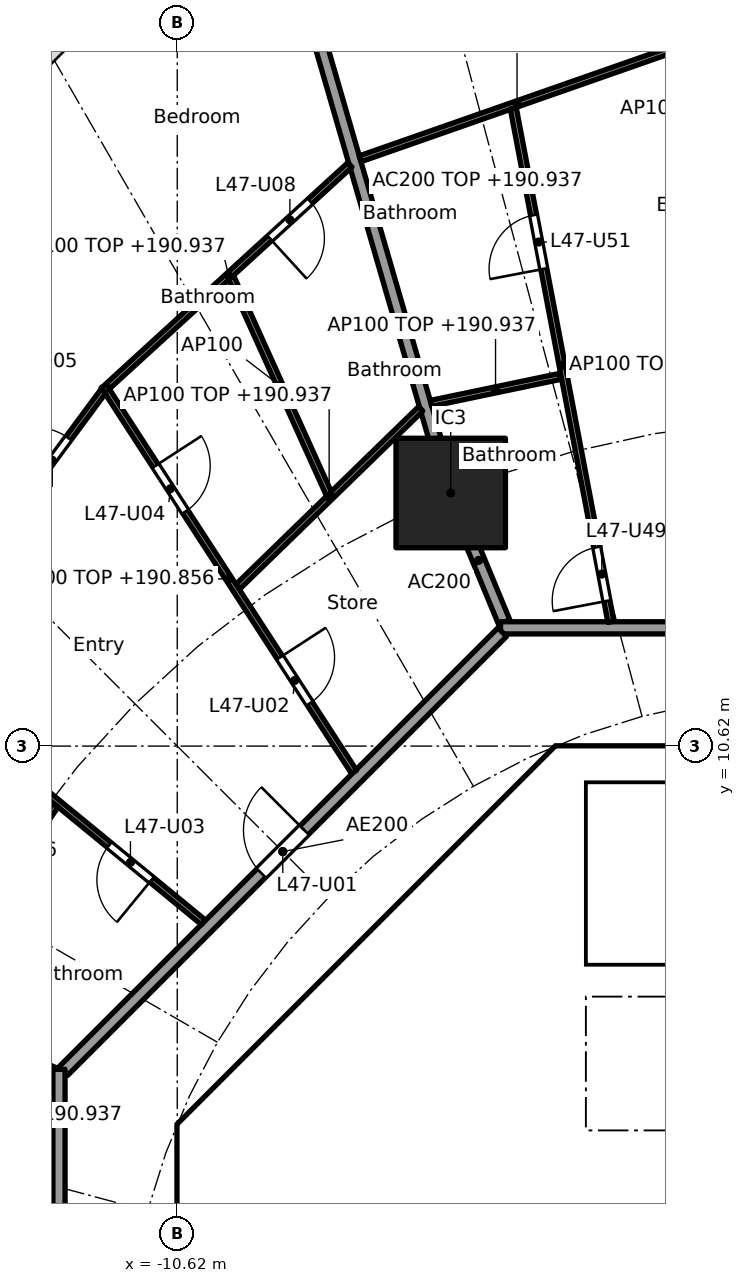
"""IFC4 building model, lengths in metres.
Left out: names, types, materials, properties, quantities, classifications, styles, units other than length and angle.
Written with IfcOpenShell. Run it as: python <this file> out.ifc"""

import sys

from ifc_helpers import new_model, si_unit, direction, frame, frame_2d, origin, origin_2d, place, context, subcontext, project, spatial, polyline, rectangle, outline, extrude, element, fill, save


model = new_model("IFC4")
c1 = context("Model", 3, precision=1e-05, world=origin(), true_north=direction((0.0, 1.0)))
c2 = subcontext(c1, "Body", "Model", "MODEL_VIEW")
j1 = project(units=[si_unit("LENGTHUNIT", "METRE"), si_unit("PLANEANGLEUNIT", "RADIAN")], contexts=[c1])
p1 = place(None, origin())
s1 = spatial("IfcSite", under=j1, at=p1, CompositionType="ELEMENT")
p2 = place(p1, origin())
s2 = spatial("IfcBuilding", under=s1, at=p2, CompositionType="ELEMENT")
p3 = place(p2, frame((0.0, 0.0, 188.1)))
s3 = spatial("IfcBuildingStorey", under=s2, at=p3, CompositionType="ELEMENT", Elevation=188.1)
p4 = place(p3, frame((-6.123, 14.782, 0.0), z_axis=(0.0, 0.0, 1.0), x_axis=(1.0, 0.0, 0.0)))
e1 = element("IfcColumn", 1, at=p4, inside=s3, PredefinedType="COLUMN", context=c2, shape_type="SweptSolid", body=[
    extrude(rectangle(XDim=1.8, YDim=1.8, at=origin_2d()), origin(), (0.0, 0.0, 1.0), 3.7),
])
p5 = place(p3, frame((-4.613, 9.988, 0.0), z_axis=(0.0, 0.0, 1.0), x_axis=(-0.707106781187, -0.707106781187, 0.0)))
e2 = element("IfcWall", 2, at=p5, inside=s3, PredefinedType="SHEAR", context=c2, shape_type="SweptSolid", body=[
    extrude(rectangle(XDim=7.602, YDim=0.6, at=frame_2d((3.801, 0.0))), origin(), (0.0, 0.0, 1.0), 3.44),
])
p6 = place(p5, frame((0.351, 0.0, 0.0)))
e3 = element("IfcOpeningElement", 3, at=p6, cuts=e2, PredefinedType="OPENING", context=c2, shape_type="SweptSolid", body=[
    extrude(rectangle(XDim=1.1, YDim=2.1, at=frame_2d((0.55, 1.05))), frame((0.0, 0.31, 0.0), z_axis=(0.0, -1.0, 0.0), x_axis=(1.0, 0.0, 0.0)), (0.0, 0.0, 1.0), 0.62),
])
p7 = place(p3, frame((-10.325, 3.801, 0.0), z_axis=(0.0, 0.0, 1.0), x_axis=(0.0, -1.0, 0.0)))
e4 = element("IfcWall", 4, at=p7, inside=s3, PredefinedType="SHEAR", context=c2, shape_type="SweptSolid", body=[
    extrude(rectangle(XDim=7.602, YDim=0.6, at=frame_2d((3.801, 0.0))), origin(), (0.0, 0.0, 1.0), 3.44),
])
p8 = place(p7, frame((0.651, 0.0, 0.0)))
e5 = element("IfcOpeningElement", 5, at=p8, cuts=e4, PredefinedType="OPENING", context=c2, shape_type="SweptSolid", body=[
    extrude(rectangle(XDim=1.5, YDim=2.1, at=frame_2d((0.75, 1.05))), frame((0.0, 0.31, 0.0), z_axis=(0.0, -1.0, 0.0), x_axis=(1.0, 0.0, 0.0)), (0.0, 0.0, 1.0), 0.62),
])
p9 = place(p7, frame((5.451, 0.0, 0.0)))
e6 = element("IfcOpeningElement", 6, at=p9, cuts=e4, PredefinedType="OPENING", context=c2, shape_type="SweptSolid", body=[
    extrude(rectangle(XDim=1.5, YDim=2.1, at=frame_2d((0.75, 1.05))), frame((0.0, 0.31, 0.0), z_axis=(0.0, -1.0, 0.0), x_axis=(1.0, 0.0, 0.0)), (0.0, 0.0, 1.0), 0.62),
])
p10 = place(p3, frame((-6.2, 4.3, 0.0), z_axis=(0.0, 0.0, 1.0), x_axis=(0.0, 1.0, 0.0)))
e7 = element("IfcWall", 7, at=p10, inside=s3, PredefinedType="PARTITIONING", context=c2, shape_type="SweptSolid", body=[
    extrude(rectangle(XDim=3.527, YDim=0.15, at=frame_2d((1.763, 0.0))), origin(), (0.0, 0.0, 1.0), 3.44),
])
p11 = place(p10, frame((0.262, 0.0, 0.0)))
e8 = element("IfcOpeningElement", 8, at=p11, cuts=e7, PredefinedType="OPENING", context=c2, shape_type="SweptSolid", body=[
    extrude(rectangle(XDim=0.9, YDim=2.1, at=frame_2d((0.45, 1.05))), frame((0.0, 0.085, 0.0), z_axis=(0.0, -1.0, 0.0), x_axis=(1.0, 0.0, 0.0)), (0.0, 0.0, 1.0), 0.17),
])
p12 = place(p10, frame((2.138, 0.0, 0.0)))
e9 = element("IfcOpeningElement", 9, at=p12, cuts=e7, PredefinedType="OPENING", context=c2, shape_type="SweptSolid", body=[
    extrude(rectangle(XDim=0.9, YDim=2.1, at=frame_2d((0.45, 1.05))), frame((0.0, 0.085, 0.0), z_axis=(0.0, -1.0, 0.0), x_axis=(1.0, 0.0, 0.0)), (0.0, 0.0, 1.0), 0.17),
])
p13 = place(p3, frame((-4.0, 4.3, 0.0), z_axis=(0.0, 0.0, 1.0), x_axis=(0.0, 1.0, 0.0)))
e10 = element("IfcWall", 10, at=p13, inside=s3, PredefinedType="SOLIDWALL", context=c2, shape_type="SweptSolid", body=[
    extrude(rectangle(XDim=2.2, YDim=0.2, at=frame_2d((1.1, 0.0))), origin(), (0.0, 0.0, 1.0), 3.44),
])
p14 = place(p13, frame((0.55, 0.0, 0.0)))
e11 = element("IfcOpeningElement", 11, at=p14, cuts=e10, PredefinedType="OPENING", context=c2, shape_type="SweptSolid", body=[
    extrude(rectangle(XDim=1.1, YDim=2.1, at=frame_2d((0.55, 1.05))), frame((0.0, 0.11, 0.0), z_axis=(0.0, -1.0, 0.0), x_axis=(1.0, 0.0, 0.0)), (0.0, 0.0, 1.0), 0.22),
])
p15 = place(p3, origin())
e12 = element("IfcWall", 12, at=p15, inside=s3, PredefinedType="SHEAR", context=c2, shape_type="SweptSolid", body=[
    extrude(outline(polyline([(-10.2, 4.825), (-9.776, 4.401), (-10.025, 4.152), (-10.025, 3.801), (-10.625, 3.801), (-10.625, 4.401), (-10.2, 4.825)])), origin(), (0.0, 0.0, 1.0), 3.44),
])
p16 = place(p3, origin())
e13 = element("IfcWall", 13, at=p16, inside=s3, PredefinedType="SHEAR", context=c2, shape_type="SweptSolid", body=[
    extrude(outline(polyline([(-4.152, 10.025), (-4.401, 9.776), (-4.825, 10.2), (-4.401, 10.625), (4.401, 10.625), (4.825, 10.2), (4.401, 9.776), (4.152, 10.025), (-4.152, 10.025)])), origin(), (0.0, 0.0, 1.0), 3.44),
])
p17 = place(p3, frame((-10.025, 4.0, 0.0), z_axis=(0.0, 0.0, 1.0), x_axis=(1.0, 0.0, 0.0)))
e14 = element("IfcWall", 14, at=p17, inside=s3, PredefinedType="PARTITIONING", context=c2, shape_type="SweptSolid", body=[
    extrude(rectangle(XDim=3.325, YDim=0.2, at=frame_2d((1.662, 0.0))), origin(), (0.0, 0.0, 1.0), 3.44),
])
p18 = place(p3, frame((-8.301, 5.8, 0.0), z_axis=(0.0, 0.0, 1.0), x_axis=(1.0, 0.0, 0.0)))
e15 = element("IfcWall", 15, at=p18, inside=s3, PredefinedType="PARTITIONING", context=c2, shape_type="SweptSolid", body=[
    extrude(rectangle(XDim=2.026, YDim=0.15, at=frame_2d((1.013, 0.0))), origin(), (0.0, 0.0, 1.0), 3.44),
])
p19 = place(p3, origin())
e16 = element("IfcWall", 16, at=p19, inside=s3, PredefinedType="SOLIDWALL", context=c2, shape_type="SweptSolid", body=[
    extrude(outline(polyline([(-6.7, 4.3), (6.7, 4.3), (6.7, 2.1), (6.5, 2.1), (6.5, 4.1), (4.5, 4.1), (4.5, 2.1), (4.3, 2.1), (4.3, 4.1), (2.3, 4.1), (2.3, 2.1), (2.1, 2.1), (2.1, 4.1), (0.1, 4.1), (0.1, 2.1), (-0.1, 2.1), (-0.1, 4.1), (-2.1, 4.1), (-2.1, 2.1), (-2.3, 2.1), (-2.3, 4.1), (-6.5, 4.1), (-6.5, 2.1), (-6.7, 2.1), (-6.7, 4.3)])), origin(), (0.0, 0.0, 1.0), 3.44),
])
p20 = place(p3, origin())
e17 = element("IfcWall", 17, at=p20, inside=s3, PredefinedType="SOLIDWALL", context=c2, shape_type="SweptSolid", body=[
    extrude(outline(polyline([(-3.9, 7.025), (-4.1, 7.025), (-4.1, 10.025), (-3.9, 10.025), (-3.9, 7.025)])), origin(), (0.0, 0.0, 1.0), 3.44),
])
p21 = place(p3, origin())
e18 = element("IfcWall", 18, at=p21, inside=s3, PredefinedType="SOLIDWALL", context=c2, shape_type="SweptSolid", body=[
    extrude(outline(polyline([(4.1, 6.5), (-4.1, 6.5), (-4.1, 7.025), (4.1, 7.025), (4.1, 6.5)])), origin(), (0.0, 0.0, 1.0), 3.44),
])
p22 = place(p3, frame((-5.243, 12.657, 0.0), z_axis=(0.0, 0.0, 1.0), x_axis=(-0.382707856524, 0.923869415315, 0.0)))
e19 = element("IfcWall", 19, at=p22, inside=s3, PredefinedType="PARTITIONING", context=c2, shape_type="SweptSolid", body=[
    extrude(rectangle(XDim=2.2, YDim=0.2, at=frame_2d((1.1, 0.0))), origin(), (0.0, 0.0, 1.0), 3.44),
])
p23 = place(p3, frame((-6.137, 14.83, 0.0), z_axis=(0.0, 0.0, 1.0), x_axis=(-0.278461169897, 0.96044748782, 0.0)))
e20 = element("IfcWall", 20, at=p23, inside=s3, PredefinedType="PARTITIONING", context=c2, shape_type="SweptSolid", body=[
    extrude(rectangle(XDim=9.573, YDim=0.2, at=frame_2d((4.787, 0.0))), origin(), (0.0, 0.0, 1.0), 2.837),
])
p24 = place(p3, frame((-12.657, 5.243, 0.0), z_axis=(0.0, 0.0, 1.0), x_axis=(-0.923859888513, 0.38273085373, 0.0)))
e21 = element("IfcWall", 21, at=p24, inside=s3, PredefinedType="PARTITIONING", context=c2, shape_type="SweptSolid", body=[
    extrude(rectangle(XDim=2.199, YDim=0.2, at=frame_2d((1.1, 0.0))), origin(), (0.0, 0.0, 1.0), 3.44),
])
p25 = place(p3, frame((5.104, 12.565, 0.0), z_axis=(0.0, 0.0, 1.0), x_axis=(-1.0, 0.0, 0.0)))
e22 = element("IfcWall", 22, at=p25, inside=s3, PredefinedType="PARTITIONING", context=c2, shape_type="SweptSolid", body=[
    extrude(rectangle(XDim=10.409, YDim=0.2, at=frame_2d((5.205, 0.0))), origin(), (0.0, 0.0, 1.0), 3.44),
])
p26 = place(p25, frame((6.339, 0.0, 0.0)))
e23 = element("IfcOpeningElement", 23, at=p26, cuts=e22, PredefinedType="OPENING", context=c2, shape_type="SweptSolid", body=[
    extrude(rectangle(XDim=1.0, YDim=2.1, at=frame_2d((0.5, 1.05))), frame((0.0, 0.11, 0.0), z_axis=(0.0, -1.0, 0.0), x_axis=(1.0, 0.0, 0.0)), (0.0, 0.0, 1.0), 0.22),
])
p27 = place(p3, frame((-5.275, 12.494, 0.0), z_axis=(0.0, 0.0, 1.0), x_axis=(-0.707106781187, -0.707106781187, 0.0)))
e24 = element("IfcWall", 24, at=p27, inside=s3, PredefinedType="PARTITIONING", context=c2, shape_type="SweptSolid", body=[
    extrude(rectangle(XDim=10.209, YDim=0.2, at=frame_2d((5.104, 0.0))), origin(), (0.0, 0.0, 1.0), 3.44),
])
p28 = place(p27, frame((4.604, 0.0, 0.0)))
e25 = element("IfcOpeningElement", 25, at=p28, cuts=e24, PredefinedType="OPENING", context=c2, shape_type="SweptSolid", body=[
    extrude(rectangle(XDim=1.0, YDim=2.1, at=frame_2d((0.5, 1.05))), frame((0.0, 0.11, 0.0), z_axis=(0.0, -1.0, 0.0), x_axis=(1.0, 0.0, 0.0)), (0.0, 0.0, 1.0), 0.22),
])
p29 = place(p3, frame((-12.565, 5.304, 0.0), z_axis=(0.0, 0.0, 1.0), x_axis=(0.0, -1.0, 0.0)))
e26 = element("IfcWall", 26, at=p29, inside=s3, PredefinedType="PARTITIONING", context=c2, shape_type="SweptSolid", body=[
    extrude(rectangle(XDim=10.409, YDim=0.2, at=frame_2d((5.205, 0.0))), origin(), (0.0, 0.0, 1.0), 3.44),
])
p30 = place(p29, frame((4.804, 0.0, 0.0)))
e27 = element("IfcOpeningElement", 27, at=p30, cuts=e26, PredefinedType="OPENING", context=c2, shape_type="SweptSolid", body=[
    extrude(rectangle(XDim=1.0, YDim=2.1, at=frame_2d((0.5, 1.05))), frame((0.0, 0.11, 0.0), z_axis=(0.0, -1.0, 0.0), x_axis=(1.0, 0.0, 0.0)), (0.0, 0.0, 1.0), 0.22),
])
p31 = place(p3, frame((-2.452, 22.083, 0.0), z_axis=(0.0, 0.0, 1.0), x_axis=(-0.943918212431, -0.330179357684, 0.0)))
e28 = element("IfcWall", 28, at=p31, inside=s3, PredefinedType="PARTITIONING", context=c2, shape_type="SweptSolid", body=[
    extrude(rectangle(XDim=5.467, YDim=0.1, at=frame_2d((2.734, 0.0))), origin(), (0.0, 0.0, 1.0), 2.837),
])
p32 = place(p3, frame((-3.488, 12.663, 0.0), z_axis=(0.0, 0.0, 1.0), x_axis=(-0.186783185485, 0.982401161247, 0.0)))
e29 = element("IfcWall", 29, at=p32, inside=s3, PredefinedType="PARTITIONING", context=c2, shape_type="SweptSolid", body=[
    extrude(rectangle(XDim=8.595, YDim=0.1, at=frame_2d((4.298, 0.0))), origin(), (0.0, 0.0, 1.0), 2.756),
])
p33 = place(p32, frame((0.35, 0.0, 0.0)))
e30 = element("IfcOpeningElement", 30, at=p33, cuts=e29, PredefinedType="OPENING", context=c2, shape_type="SweptSolid", body=[
    extrude(rectangle(XDim=0.9, YDim=2.1, at=frame_2d((0.45, 1.05))), frame((0.0, 0.06, 0.0), z_axis=(0.0, -1.0, 0.0), x_axis=(1.0, 0.0, 0.0)), (0.0, 0.0, 1.0), 0.12),
])
p34 = place(p32, frame((5.908, 0.0, 0.0)))
e31 = element("IfcOpeningElement", 31, at=p34, cuts=e29, PredefinedType="OPENING", context=c2, shape_type="SweptSolid", body=[
    extrude(rectangle(XDim=0.9, YDim=2.1, at=frame_2d((0.45, 1.05))), frame((0.0, 0.06, 0.0), z_axis=(0.0, -1.0, 0.0), x_axis=(1.0, 0.0, 0.0)), (0.0, 0.0, 1.0), 0.12),
])
p35 = place(p3, frame((-4.324, 16.699, 0.0), z_axis=(0.0, 0.0, 1.0), x_axis=(-0.978909151576, -0.204296042448, 0.0)))
e32 = element("IfcWall", 32, at=p35, inside=s3, PredefinedType="PARTITIONING", context=c2, shape_type="SweptSolid", body=[
    extrude(rectangle(XDim=2.168, YDim=0.1, at=frame_2d((1.084, 0.0))), origin(), (0.0, 0.0, 1.0), 2.837),
])
p36 = place(p3, frame((-6.616, 16.166, 0.0), z_axis=(0.0, 0.0, 1.0), x_axis=(-0.716919058692, -0.697156412352, 0.0)))
e33 = element("IfcWall", 33, at=p36, inside=s3, PredefinedType="PARTITIONING", context=c2, shape_type="SweptSolid", body=[
    extrude(rectangle(XDim=4.2, YDim=0.1, at=frame_2d((2.1, 0.0))), origin(), (0.0, 0.0, 1.0), 2.837),
])
p37 = place(p3, frame((-7.781, 20.178, 0.0), z_axis=(0.0, 0.0, 1.0), x_axis=(-0.73807320557, -0.674720640872, 0.0)))
e34 = element("IfcWall", 34, at=p37, inside=s3, PredefinedType="PARTITIONING", context=c2, shape_type="SweptSolid", body=[
    extrude(rectangle(XDim=5.399, YDim=0.1, at=frame_2d((2.699, 0.0))), origin(), (0.0, 0.0, 1.0), 2.837),
])
p38 = place(p37, frame((0.887, 0.0, 0.0)))
e35 = element("IfcOpeningElement", 35, at=p38, cuts=e34, PredefinedType="OPENING", context=c2, shape_type="SweptSolid", body=[
    extrude(rectangle(XDim=0.9, YDim=2.1, at=frame_2d((0.45, 1.05))), frame((0.0, 0.06, 0.0), z_axis=(0.0, -1.0, 0.0), x_axis=(1.0, 0.0, 0.0)), (0.0, 0.0, 1.0), 0.12),
])
p39 = place(p3, frame((-8.125, 14.765, 0.0), z_axis=(0.0, 0.0, 1.0), x_axis=(-0.411745679848, 0.911298795745, 0.0)))
e36 = element("IfcWall", 36, at=p39, inside=s3, PredefinedType="PARTITIONING", context=c2, shape_type="SweptSolid", body=[
    extrude(rectangle(XDim=3.909, YDim=0.1, at=frame_2d((1.955, 0.0))), origin(), (0.0, 0.0, 1.0), 3.44),
])
p40 = place(p3, frame((-7.712, 10.195, 0.0), z_axis=(0.0, 0.0, 1.0), x_axis=(-0.544179442551, 0.838968851809, 0.0)))
e37 = element("IfcWall", 37, at=p40, inside=s3, PredefinedType="PARTITIONING", context=c2, shape_type="SweptSolid", body=[
    extrude(rectangle(XDim=7.566, YDim=0.1, at=frame_2d((3.783, 0.0))), origin(), (0.0, 0.0, 1.0), 2.756),
])
p41 = place(p40, frame((1.343, 0.0, 0.0)))
e38 = element("IfcOpeningElement", 38, at=p41, cuts=e37, PredefinedType="OPENING", context=c2, shape_type="SweptSolid", body=[
    extrude(rectangle(XDim=0.9, YDim=2.1, at=frame_2d((0.45, 1.05))), frame((0.0, 0.06, 0.0), z_axis=(0.0, -1.0, 0.0), x_axis=(1.0, 0.0, 0.0)), (0.0, 0.0, 1.0), 0.12),
])
p42 = place(p40, frame((5.101, 0.0, 0.0)))
e39 = element("IfcOpeningElement", 39, at=p42, cuts=e37, PredefinedType="OPENING", context=c2, shape_type="SweptSolid", body=[
    extrude(rectangle(XDim=0.9, YDim=2.1, at=frame_2d((0.45, 1.05))), frame((0.0, 0.06, 0.0), z_axis=(0.0, -1.0, 0.0), x_axis=(1.0, 0.0, 0.0)), (0.0, 0.0, 1.0), 0.12),
])
p43 = place(p3, frame((-11.832, 16.461, 0.0), z_axis=(0.0, 0.0, 1.0), x_axis=(-0.594704483906, -0.803944386647, 0.0)))
e40 = element("IfcWall", 40, at=p43, inside=s3, PredefinedType="PARTITIONING", context=c2, shape_type="SweptSolid", body=[
    extrude(rectangle(XDim=5.672, YDim=0.1, at=frame_2d((2.836, 0.0))), origin(), (0.0, 0.0, 1.0), 2.837),
])
p44 = place(p43, frame((0.968, 0.0, 0.0)))
e41 = element("IfcOpeningElement", 41, at=p44, cuts=e40, PredefinedType="OPENING", context=c2, shape_type="SweptSolid", body=[
    extrude(rectangle(XDim=0.9, YDim=2.1, at=frame_2d((0.45, 1.05))), frame((0.0, 0.06, 0.0), z_axis=(0.0, -1.0, 0.0), x_axis=(1.0, 0.0, 0.0)), (0.0, 0.0, 1.0), 0.12),
])
p45 = place(p43, frame((3.804, 0.0, 0.0)))
e42 = element("IfcOpeningElement", 42, at=p45, cuts=e40, PredefinedType="OPENING", context=c2, shape_type="SweptSolid", body=[
    extrude(rectangle(XDim=0.9, YDim=2.1, at=frame_2d((0.45, 1.05))), frame((0.0, 0.06, 0.0), z_axis=(0.0, -1.0, 0.0), x_axis=(1.0, 0.0, 0.0)), (0.0, 0.0, 1.0), 0.12),
])
p46 = place(p3, frame((-10.189, 7.721, 0.0), z_axis=(0.0, 0.0, 1.0), x_axis=(-0.773121441079, 0.634258021112, 0.0)))
e43 = element("IfcWall", 43, at=p46, inside=s3, PredefinedType="PARTITIONING", context=c2, shape_type="SweptSolid", body=[
    extrude(rectangle(XDim=6.577, YDim=0.1, at=frame_2d((3.289, 0.0))), origin(), (0.0, 0.0, 1.0), 2.756),
])
p47 = place(p46, frame((1.104, 0.0, 0.0)))
e44 = element("IfcOpeningElement", 44, at=p47, cuts=e43, PredefinedType="OPENING", context=c2, shape_type="SweptSolid", body=[
    extrude(rectangle(XDim=0.9, YDim=2.1, at=frame_2d((0.45, 1.05))), frame((0.0, 0.06, 0.0), z_axis=(0.0, -1.0, 0.0), x_axis=(1.0, 0.0, 0.0)), (0.0, 0.0, 1.0), 0.12),
])
p48 = place(p46, frame((4.367, 0.0, 0.0)))
e45 = element("IfcOpeningElement", 45, at=p48, cuts=e43, PredefinedType="OPENING", context=c2, shape_type="SweptSolid", body=[
    extrude(rectangle(XDim=0.9, YDim=2.1, at=frame_2d((0.45, 1.05))), frame((0.0, 0.06, 0.0), z_axis=(0.0, -1.0, 0.0), x_axis=(1.0, 0.0, 0.0)), (0.0, 0.0, 1.0), 0.12),
])
p49 = place(p3, frame((-12.619, 9.65, 0.0), z_axis=(0.0, 0.0, 1.0), x_axis=(-0.561046521684, -0.82778427172, 0.0)))
e46 = element("IfcWall", 46, at=p49, inside=s3, PredefinedType="PARTITIONING", context=c2, shape_type="SweptSolid", body=[
    extrude(rectangle(XDim=4.109, YDim=0.1, at=frame_2d((2.054, 0.0))), origin(), (0.0, 0.0, 1.0), 3.44),
])
p50 = place(p3, frame((-12.663, 2.621, 0.0), z_axis=(0.0, 0.0, 1.0), x_axis=(-0.983176884312, 0.182655999505, 0.0)))
e47 = element("IfcWall", 47, at=p50, inside=s3, PredefinedType="PARTITIONING", context=c2, shape_type="SweptSolid", body=[
    extrude(rectangle(XDim=2.483, YDim=0.1, at=frame_2d((1.242, 0.0))), origin(), (0.0, 0.0, 1.0), 2.756),
])
p51 = place(p50, frame((0.792, 0.0, 0.0)))
e48 = element("IfcOpeningElement", 48, at=p51, cuts=e47, PredefinedType="OPENING", context=c2, shape_type="SweptSolid", body=[
    extrude(rectangle(XDim=0.9, YDim=2.1, at=frame_2d((0.45, 1.05))), frame((0.0, 0.06, 0.0), z_axis=(0.0, -1.0, 0.0), x_axis=(1.0, 0.0, 0.0)), (0.0, 0.0, 1.0), 0.12),
])
p52 = place(p14, origin())
e49 = element("IfcDoor", 49, at=p52, inside=s3, OperationType="DOUBLE_DOOR_SLIDING", PredefinedType="DOOR", context=c2, shape_type="SweptSolid", body=[
    extrude(rectangle(XDim=1.1, YDim=2.1, at=frame_2d((0.55, 1.05))), frame((0.0, 0.025, 0.0), z_axis=(0.0, -1.0, 0.0), x_axis=(1.0, 0.0, 0.0)), (0.0, 0.0, 1.0), 0.05),
])
fill(e11, e49)
p53 = place(p11, origin())
e50 = element("IfcDoor", 50, at=p53, inside=s3, OperationType="SINGLE_SWING_LEFT", PredefinedType="DOOR", context=c2, shape_type="SweptSolid", body=[
    extrude(rectangle(XDim=0.9, YDim=2.1, at=frame_2d((0.45, 1.05))), frame((0.0, 0.025, 0.0), z_axis=(0.0, -1.0, 0.0), x_axis=(1.0, 0.0, 0.0)), (0.0, 0.0, 1.0), 0.05),
])
fill(e8, e50)
p54 = place(p12, origin())
e51 = element("IfcDoor", 51, at=p54, inside=s3, OperationType="SINGLE_SWING_LEFT", PredefinedType="DOOR", context=c2, shape_type="SweptSolid", body=[
    extrude(rectangle(XDim=0.9, YDim=2.1, at=frame_2d((0.45, 1.05))), frame((0.0, 0.025, 0.0), z_axis=(0.0, -1.0, 0.0), x_axis=(1.0, 0.0, 0.0)), (0.0, 0.0, 1.0), 0.05),
])
fill(e9, e51)
p55 = place(p8, origin())
e52 = element("IfcDoor", 52, at=p55, inside=s3, OperationType="DOUBLE_DOOR_SINGLE_SWING", PredefinedType="DOOR", context=c2, shape_type="SweptSolid", body=[
    extrude(rectangle(XDim=1.5, YDim=2.1, at=frame_2d((0.75, 1.05))), frame((0.0, 0.025, 0.0), z_axis=(0.0, -1.0, 0.0), x_axis=(1.0, 0.0, 0.0)), (0.0, 0.0, 1.0), 0.05),
])
fill(e5, e52)
p56 = place(p6, origin())
e53 = element("IfcDoor", 53, at=p56, inside=s3, OperationType="SINGLE_SWING_RIGHT", PredefinedType="DOOR", context=c2, shape_type="SweptSolid", body=[
    extrude(rectangle(XDim=1.1, YDim=2.1, at=frame_2d((0.55, 1.05))), frame((0.0, 0.025, 0.0), z_axis=(0.0, -1.0, 0.0), x_axis=(1.0, 0.0, 0.0)), (0.0, 0.0, 1.0), 0.05),
])
fill(e3, e53)
p57 = place(p28, frame((1.0, 0.0, 0.0), x_axis=(-1.0, 0.0, 0.0)))
e54 = element("IfcDoor", 54, at=p57, inside=s3, OperationType="SINGLE_SWING_RIGHT", PredefinedType="DOOR", context=c2, shape_type="SweptSolid", body=[
    extrude(rectangle(XDim=1.0, YDim=2.1, at=frame_2d((0.5, 1.05))), frame((0.0, 0.025, 0.0), z_axis=(0.0, -1.0, 0.0), x_axis=(1.0, 0.0, 0.0)), (0.0, 0.0, 1.0), 0.05),
])
fill(e25, e54)
p58 = place(p41, frame((0.9, 0.0, 0.0), x_axis=(-1.0, 0.0, 0.0)))
e55 = element("IfcDoor", 55, at=p58, inside=s3, OperationType="SINGLE_SWING_LEFT", PredefinedType="DOOR", context=c2, shape_type="SweptSolid", body=[
    extrude(rectangle(XDim=0.9, YDim=2.1, at=frame_2d((0.45, 1.05))), frame((0.0, 0.025, 0.0), z_axis=(0.0, -1.0, 0.0), x_axis=(1.0, 0.0, 0.0)), (0.0, 0.0, 1.0), 0.05),
])
fill(e38, e55)
p59 = place(p47, origin())
e56 = element("IfcDoor", 56, at=p59, inside=s3, OperationType="SINGLE_SWING_LEFT", PredefinedType="DOOR", context=c2, shape_type="SweptSolid", body=[
    extrude(rectangle(XDim=0.9, YDim=2.1, at=frame_2d((0.45, 1.05))), frame((0.0, 0.025, 0.0), z_axis=(0.0, -1.0, 0.0), x_axis=(1.0, 0.0, 0.0)), (0.0, 0.0, 1.0), 0.05),
])
fill(e44, e56)
p60 = place(p42, frame((0.9, 0.0, 0.0), x_axis=(-1.0, 0.0, 0.0)))
e57 = element("IfcDoor", 57, at=p60, inside=s3, OperationType="SINGLE_SWING_LEFT", PredefinedType="DOOR", context=c2, shape_type="SweptSolid", body=[
    extrude(rectangle(XDim=0.9, YDim=2.1, at=frame_2d((0.45, 1.05))), frame((0.0, 0.025, 0.0), z_axis=(0.0, -1.0, 0.0), x_axis=(1.0, 0.0, 0.0)), (0.0, 0.0, 1.0), 0.05),
])
fill(e39, e57)
p61 = place(p44, frame((0.9, 0.0, 0.0), x_axis=(-1.0, 0.0, 0.0)))
e58 = element("IfcDoor", 58, at=p61, inside=s3, OperationType="SINGLE_SWING_LEFT", PredefinedType="DOOR", context=c2, shape_type="SweptSolid", body=[
    extrude(rectangle(XDim=0.9, YDim=2.1, at=frame_2d((0.45, 1.05))), frame((0.0, 0.025, 0.0), z_axis=(0.0, -1.0, 0.0), x_axis=(1.0, 0.0, 0.0)), (0.0, 0.0, 1.0), 0.05),
])
fill(e41, e58)
p62 = place(p38, origin())
e59 = element("IfcDoor", 59, at=p62, inside=s3, OperationType="SINGLE_SWING_RIGHT", PredefinedType="DOOR", context=c2, shape_type="SweptSolid", body=[
    extrude(rectangle(XDim=0.9, YDim=2.1, at=frame_2d((0.45, 1.05))), frame((0.0, 0.025, 0.0), z_axis=(0.0, -1.0, 0.0), x_axis=(1.0, 0.0, 0.0)), (0.0, 0.0, 1.0), 0.05),
])
fill(e35, e59)
p63 = place(p33, origin())
e60 = element("IfcDoor", 60, at=p63, inside=s3, OperationType="SINGLE_SWING_LEFT", PredefinedType="DOOR", context=c2, shape_type="SweptSolid", body=[
    extrude(rectangle(XDim=0.9, YDim=2.1, at=frame_2d((0.45, 1.05))), frame((0.0, 0.025, 0.0), z_axis=(0.0, -1.0, 0.0), x_axis=(1.0, 0.0, 0.0)), (0.0, 0.0, 1.0), 0.05),
])
fill(e30, e60)
p64 = place(p34, origin())
e61 = element("IfcDoor", 61, at=p64, inside=s3, OperationType="SINGLE_SWING_LEFT", PredefinedType="DOOR", context=c2, shape_type="SweptSolid", body=[
    extrude(rectangle(XDim=0.9, YDim=2.1, at=frame_2d((0.45, 1.05))), frame((0.0, 0.025, 0.0), z_axis=(0.0, -1.0, 0.0), x_axis=(1.0, 0.0, 0.0)), (0.0, 0.0, 1.0), 0.05),
])
fill(e31, e61)
save(model, sys.argv[1])
